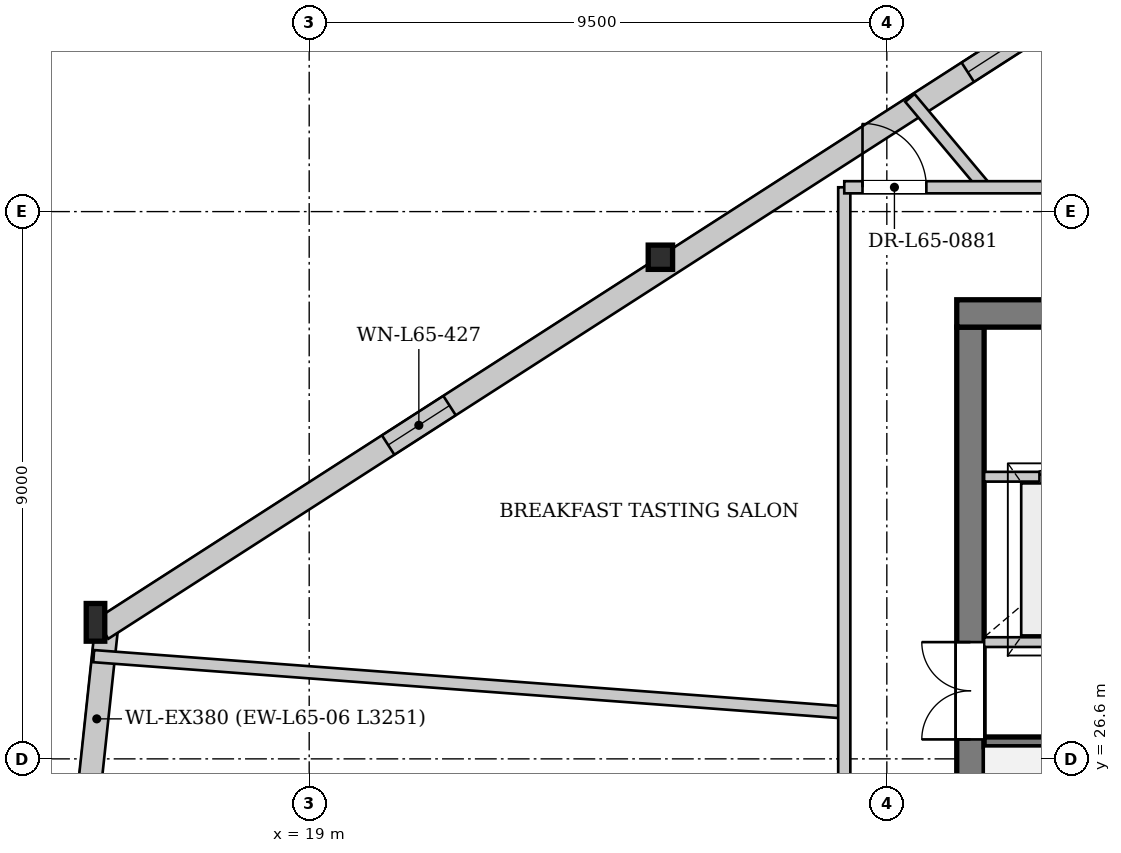
"""IFC4 building model, lengths in metres.
Left out: names, types, materials, properties, quantities, classifications, styles, units other than length and angle.
Written with IfcOpenShell. Run it as: python <this file> out.ifc"""

import sys

from ifc_helpers import new_model, si_unit, direction, frame, frame_2d, origin, origin_2d, place, context, subcontext, project, spatial, rectangle, i_section, extrude, source, transform, mapped, element, fill, save


model = new_model("IFC4")
c1 = context("Model", 3, precision=1e-05, world=origin(), true_north=direction((0.0, 1.0)))
c2 = subcontext(c1, "Body", "Model", "MODEL_VIEW")
j1 = project(units=[si_unit("LENGTHUNIT", "METRE"), si_unit("PLANEANGLEUNIT", "RADIAN")], contexts=[c1])
p1 = place(None, origin())
s1 = spatial("IfcSite", under=j1, at=p1, CompositionType="ELEMENT")
p2 = place(p1, origin())
s2 = spatial("IfcBuilding", under=s1, at=p2, CompositionType="ELEMENT")
p3 = place(p2, frame((0.0, 0.0, 245.3)))
s3 = spatial("IfcBuildingStorey", under=s2, at=p3, CompositionType="ELEMENT", Elevation=245.3)
m1 = source(origin(), c2, "Body", "SweptSolid", [
    extrude(i_section(OverallWidth=0.401, OverallDepth=0.399, WebThickness=0.022, FlangeThickness=0.034, at=origin_2d()), origin(), (0.0, 0.0, 1.0), 3.436),
])
p4 = place(p3, frame((24.794, 34.878, 0.0), z_axis=(-0.010445709399, -0.016841041685, 0.999803613951), x_axis=(0.849806327229, -0.527095063724, 0.0)))
e1 = element("IfcColumn", 1, at=p4, inside=s3, PredefinedType="COLUMN", context=c2, shape_type="MappedRepresentation", body=[
    mapped(m1, transform((0.0, 0.0, 0.0), x_axis=(1.0, 0.0, 0.0), y_axis=(0.0, 1.0, 0.0), z_axis=(0.0, 0.0, 1.0), scale=1.0)),
])
m2 = source(origin(), c2, "Body", "SweptSolid", [
    extrude(i_section(OverallWidth=0.305, OverallDepth=0.62, WebThickness=0.021, FlangeThickness=0.04, at=origin_2d()), origin(), (0.0, 0.0, 1.0), 3.437),
])
p5 = place(p3, frame((15.49, 28.894, 0.0), z_axis=(-0.002841757073, -0.02855965858, 0.999588050308), x_axis=(0.995086086084, -0.099013540904, 0.0)))
e2 = element("IfcColumn", 2, at=p5, inside=s3, PredefinedType="COLUMN", context=c2, shape_type="MappedRepresentation", body=[
    mapped(m2, transform((0.0, 0.0, 0.0), x_axis=(1.0, 0.0, 0.0), y_axis=(0.0, 1.0, 0.0), z_axis=(0.0, 0.0, 1.0), scale=1.0)),
])
p6 = place(p3, frame((15.334, 25.642, 0.0), z_axis=(0.0, 0.0, 1.0), x_axis=(0.106260010947, 0.994338378055, 0.0)))
e3 = element("IfcWall", 3, at=p6, inside=s3, PredefinedType="SOLIDWALL", context=c2, shape_type="SweptSolid", body=[
    extrude(rectangle(XDim=3.251, YDim=0.38, at=frame_2d((1.625, 0.0))), origin(), (0.0, 0.0, 1.0), 2.872),
])
p7 = place(p3, frame((15.593, 28.735, 0.0), z_axis=(0.0, 0.0, 1.0), x_axis=(0.841061212788, 0.54093995632, 0.0)))
e4 = element("IfcWall", 4, at=p7, inside=s3, PredefinedType="SOLIDWALL", context=c2, shape_type="SweptSolid", body=[
    extrude(rectangle(XDim=22.124, YDim=0.38, at=frame_2d((11.062, 0.0))), origin(), (0.0, 0.0, 1.0), 2.872),
])
p8 = place(p7, frame((5.595, 0.0, 0.65)))
e5 = element("IfcOpeningElement", 5, at=p8, cuts=e4, PredefinedType="OPENING", context=c2, shape_type="SweptSolid", body=[
    extrude(rectangle(XDim=1.2, YDim=1.5, at=frame_2d((0.6, 0.75))), frame((0.0, 0.2, 0.0), z_axis=(0.0, -1.0, 0.0), x_axis=(1.0, 0.0, 0.0)), (0.0, 0.0, 1.0), 0.4),
])
p9 = place(p7, frame((16.929, 0.0, 0.65)))
e6 = element("IfcOpeningElement", 6, at=p9, cuts=e4, PredefinedType="OPENING", context=c2, shape_type="SweptSolid", body=[
    extrude(rectangle(XDim=1.2, YDim=1.5, at=frame_2d((0.6, 0.75))), frame((0.0, 0.2, 0.0), z_axis=(0.0, -1.0, 0.0), x_axis=(1.0, 0.0, 0.0)), (0.0, 0.0, 1.0), 0.4),
])
p10 = place(p3, frame((29.875, 19.5, 0.0), z_axis=(0.0, 0.0, 1.0), x_axis=(0.0, 1.0, 0.0)))
e7 = element("IfcWall", 7, at=p10, inside=s3, PredefinedType="SHEAR", context=c2, shape_type="SweptSolid", body=[
    extrude(rectangle(XDim=14.2, YDim=0.45, at=frame_2d((7.1, 0.0))), origin(), (0.0, 0.0, 1.0), 3.38),
])
p11 = place(p10, frame((7.42, 0.0, 0.0)))
e8 = element("IfcOpeningElement", 8, at=p11, cuts=e7, PredefinedType="OPENING", context=c2, shape_type="SweptSolid", body=[
    extrude(rectangle(XDim=1.6, YDim=2.2, at=frame_2d((0.8, 1.1))), frame((0.0, 0.235, 0.0), z_axis=(0.0, -1.0, 0.0), x_axis=(1.0, 0.0, 0.0)), (0.0, 0.0, 1.0), 0.47),
])
p12 = place(p3, frame((29.65, 33.925, 0.0), z_axis=(0.0, 0.0, 1.0), x_axis=(1.0, 0.0, 0.0)))
e9 = element("IfcWall", 9, at=p12, inside=s3, PredefinedType="SHEAR", context=c2, shape_type="SweptSolid", body=[
    extrude(rectangle(XDim=16.7, YDim=0.45, at=frame_2d((8.35, 0.0))), origin(), (0.0, 0.0, 1.0), 3.38),
])
p13 = place(p12, frame((1.45, 0.0, 0.0)))
e10 = element("IfcOpeningElement", 10, at=p13, cuts=e9, PredefinedType="OPENING", context=c2, shape_type="SweptSolid", body=[
    extrude(rectangle(XDim=0.95, YDim=2.1, at=frame_2d((0.475, 1.05))), frame((0.0, 0.235, 0.0), z_axis=(0.0, -1.0, 0.0), x_axis=(1.0, 0.0, 0.0)), (0.0, 0.0, 1.0), 0.47),
])
p14 = place(p12, frame((3.83, 0.0, 0.0)))
e11 = element("IfcOpeningElement", 11, at=p14, cuts=e9, PredefinedType="OPENING", context=c2, shape_type="SweptSolid", body=[
    extrude(rectangle(XDim=1.32, YDim=2.2, at=frame_2d((0.66, 1.1))), frame((0.0, 0.235, 0.0), z_axis=(0.0, -1.0, 0.0), x_axis=(1.0, 0.0, 0.0)), (0.0, 0.0, 1.0), 0.47),
])
for number, where, z_axis, x_axis in (
    (12, (30.1, 26.88, 0.0), (0.0, 0.0, 1.0), (1.0, 0.0, 0.0)),
    (13, (30.1, 28.52, 0.0), (0.0, 0.0, 1.0), (1.0, 0.0, 0.0)),
):
    element("IfcWall", number, at=place(p3, frame(where, z_axis=z_axis, x_axis=x_axis)), inside=s3, PredefinedType="PARTITIONING", context=c2, shape_type="SweptSolid", body=[
        extrude(rectangle(XDim=3.02, YDim=0.16, at=frame_2d((1.51, 0.0))), origin(), (0.0, 0.0, 1.0), 3.38),
    ])
p15 = place(p3, frame((30.1, 31.24, 0.0), z_axis=(0.0, 0.0, 1.0), x_axis=(1.0, 0.0, 0.0)))
e14 = element("IfcWall", 14, at=p15, inside=s3, PredefinedType="PARTITIONING", context=c2, shape_type="SweptSolid", body=[
    extrude(rectangle(XDim=3.02, YDim=0.16, at=frame_2d((1.51, 0.0))), origin(), (0.0, 0.0, 1.0), 3.38),
])
p16 = place(p15, frame((0.91, 0.0, 0.0)))
e15 = element("IfcOpeningElement", 15, at=p16, cuts=e14, PredefinedType="OPENING", context=c2, shape_type="SweptSolid", body=[
    extrude(rectangle(XDim=1.2, YDim=2.2, at=frame_2d((0.6, 1.1))), frame((0.0, 0.09, 0.0), z_axis=(0.0, -1.0, 0.0), x_axis=(1.0, 0.0, 0.0)), (0.0, 0.0, 1.0), 0.18),
])
p17 = place(p3, frame((30.113, 36.0, 0.0), z_axis=(0.0, 0.0, 1.0), x_axis=(-0.642845923279, 0.765995508423, 0.0)))
e16 = element("IfcWall", 16, at=p17, inside=s3, PredefinedType="PARTITIONING", context=c2, shape_type="SweptSolid", body=[
    extrude(rectangle(XDim=1.919, YDim=0.2, at=frame_2d((0.959, 0.0))), origin(), (0.0, 0.0, 1.0), 3.38),
])
p18 = place(p3, frame((27.8, 27.365, 0.0), z_axis=(0.0, 0.0, 1.0), x_axis=(-0.997203941329, 0.074728170043, 0.0)))
e17 = element("IfcWall", 17, at=p18, inside=s3, PredefinedType="PARTITIONING", context=c2, shape_type="SweptSolid", body=[
    extrude(rectangle(XDim=12.379, YDim=0.2, at=frame_2d((6.189, 0.0))), origin(), (0.0, 0.0, 1.0), 3.055),
])
p19 = place(p3, frame((27.8, 17.2, 0.0), z_axis=(0.0, 0.0, 1.0), x_axis=(0.0, 1.0, 0.0)))
e18 = element("IfcWall", 18, at=p19, inside=s3, PredefinedType="PARTITIONING", context=c2, shape_type="SweptSolid", body=[
    extrude(rectangle(XDim=18.8, YDim=0.2, at=frame_2d((9.4, 0.0))), origin(), (0.0, 0.0, 1.0), 3.38),
])
p20 = place(p19, frame((4.764, 0.0, 0.0)))
e19 = element("IfcOpeningElement", 19, at=p20, cuts=e18, PredefinedType="OPENING", context=c2, shape_type="SweptSolid", body=[
    extrude(rectangle(XDim=1.05, YDim=2.2, at=frame_2d((0.525, 1.1))), frame((0.0, 0.11, 0.0), z_axis=(0.0, -1.0, 0.0), x_axis=(1.0, 0.0, 0.0)), (0.0, 0.0, 1.0), 0.22),
])
p21 = place(p3, frame((27.8, 36.0, 0.0), z_axis=(0.0, 0.0, 1.0), x_axis=(1.0, 0.0, 0.0)))
e20 = element("IfcWall", 20, at=p21, inside=s3, PredefinedType="PARTITIONING", context=c2, shape_type="SweptSolid", body=[
    extrude(rectangle(XDim=13.2, YDim=0.2, at=frame_2d((6.6, 0.0))), origin(), (0.0, 0.0, 1.0), 3.38),
])
p22 = place(p21, frame((3.484, 0.0, 0.0)))
e21 = element("IfcOpeningElement", 21, at=p22, cuts=e20, PredefinedType="OPENING", context=c2, shape_type="SweptSolid", body=[
    extrude(rectangle(XDim=1.05, YDim=2.2, at=frame_2d((0.525, 1.1))), frame((0.0, 0.11, 0.0), z_axis=(0.0, -1.0, 0.0), x_axis=(1.0, 0.0, 0.0)), (0.0, 0.0, 1.0), 0.22),
])
p23 = place(p21, frame((0.3, 0.0, 0.0)))
e22 = element("IfcOpeningElement", 22, at=p23, cuts=e20, PredefinedType="OPENING", context=c2, shape_type="SweptSolid", body=[
    extrude(rectangle(XDim=1.05, YDim=2.2, at=frame_2d((0.525, 1.1))), frame((0.0, 0.11, 0.0), z_axis=(0.0, -1.0, 0.0), x_axis=(1.0, 0.0, 0.0)), (0.0, 0.0, 1.0), 0.22),
])
m3 = source(origin(), c2, "Body", "SweptSolid", [
    extrude(rectangle(XDim=1.2, YDim=1.5, at=frame_2d((0.6, 0.75))), frame((0.0, 0.03, 0.0), z_axis=(0.0, -1.0, 0.0), x_axis=(1.0, 0.0, 0.0)), (0.0, 0.0, 1.0), 0.06),
])
p24 = place(p8, origin())
e23 = element("IfcWindow", 23, at=p24, inside=s3, PartitioningType="SINGLE_PANEL", PredefinedType="WINDOW", context=c2, shape_type="MappedRepresentation", body=[
    mapped(m3, transform((0.0, 0.0, 0.0), x_axis=(1.0, 0.0, 0.0), y_axis=(0.0, 1.0, 0.0), z_axis=(0.0, 0.0, 1.0), scale=1.0)),
])
fill(e5, e23)
p25 = place(p9, origin())
e24 = element("IfcWindow", 24, at=p25, inside=s3, PartitioningType="SINGLE_PANEL", PredefinedType="WINDOW", context=c2, shape_type="MappedRepresentation", body=[
    mapped(m3, transform((0.0, 0.0, 0.0), x_axis=(1.0, 0.0, 0.0), y_axis=(0.0, 1.0, 0.0), z_axis=(0.0, 0.0, 1.0), scale=1.0)),
])
fill(e6, e24)
m4 = source(origin(), c2, "Body", "SweptSolid", [
    extrude(rectangle(XDim=1.6, YDim=2.2, at=frame_2d((0.8, 1.1))), frame((0.0, 0.025, 0.0), z_axis=(0.0, -1.0, 0.0), x_axis=(1.0, 0.0, 0.0)), (0.0, 0.0, 1.0), 0.05),
])
p26 = place(p11, origin())
e25 = element("IfcDoor", 25, at=p26, inside=s3, OperationType="DOUBLE_DOOR_SINGLE_SWING", PredefinedType="DOOR", context=c2, shape_type="MappedRepresentation", body=[
    mapped(m4, transform((0.0, 0.0, 0.0), x_axis=(1.0, 0.0, 0.0), y_axis=(0.0, 1.0, 0.0), z_axis=(0.0, 0.0, 1.0), scale=1.0)),
])
fill(e8, e25)
m5 = source(origin(), c2, "Body", "SweptSolid", [
    extrude(rectangle(XDim=1.2, YDim=2.2, at=frame_2d((0.6, 1.1))), frame((0.0, 0.025, 0.0), z_axis=(0.0, -1.0, 0.0), x_axis=(1.0, 0.0, 0.0)), (0.0, 0.0, 1.0), 0.05),
])
p27 = place(p16, origin())
e26 = element("IfcDoor", 26, at=p27, inside=s3, OperationType="DOUBLE_DOOR_SLIDING", PredefinedType="DOOR", context=c2, shape_type="MappedRepresentation", body=[
    mapped(m5, transform((0.0, 0.0, 0.0), x_axis=(1.0, 0.0, 0.0), y_axis=(0.0, 1.0, 0.0), z_axis=(0.0, 0.0, 1.0), scale=1.0)),
])
fill(e15, e26)
m6 = source(origin(), c2, "Body", "SweptSolid", [
    extrude(rectangle(XDim=1.05, YDim=2.2, at=frame_2d((0.525, 1.1))), frame((0.0, 0.025, 0.0), z_axis=(0.0, -1.0, 0.0), x_axis=(1.0, 0.0, 0.0)), (0.0, 0.0, 1.0), 0.05),
])
p28 = place(p23, origin())
e27 = element("IfcDoor", 27, at=p28, inside=s3, OperationType="SINGLE_SWING_LEFT", PredefinedType="DOOR", context=c2, shape_type="MappedRepresentation", body=[
    mapped(m6, transform((0.0, 0.0, 0.0), x_axis=(1.0, 0.0, 0.0), y_axis=(0.0, 1.0, 0.0), z_axis=(0.0, 0.0, 1.0), scale=1.0)),
])
fill(e22, e27)
save(model, sys.argv[1])
